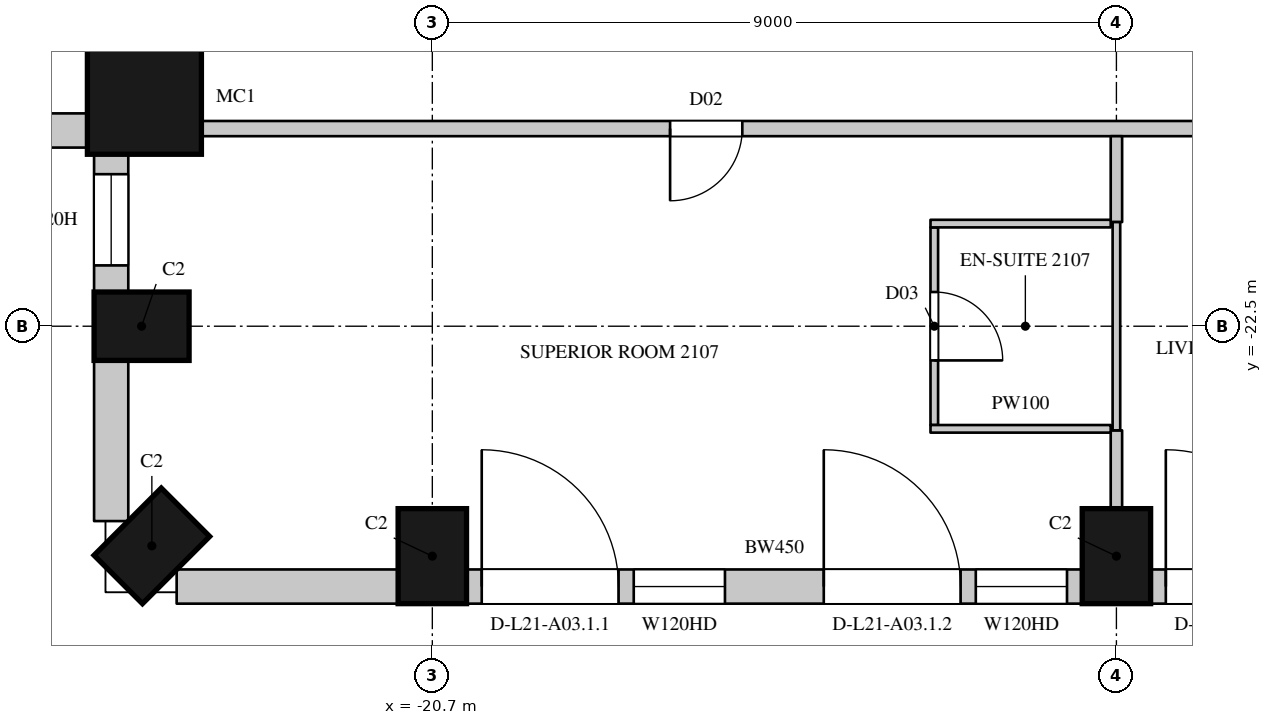
"""IFC4 building model, lengths in metres.
Left out: names, types, materials, properties, quantities, classifications, styles, units other than length and angle.
Written with IfcOpenShell. Run it as: python <this file> out.ifc"""

import sys

from ifc_helpers import new_model, si_unit, direction, frame, frame_2d, origin, origin_2d, place, context, subcontext, project, spatial, rectangle, circle, extrude, element, fill, save


model = new_model("IFC4")
c1 = context("Model", 3, precision=1e-05, world=origin(), true_north=direction((0.0, 1.0)))
c2 = subcontext(c1, "Body", "Model", "MODEL_VIEW")
j1 = project(units=[si_unit("LENGTHUNIT", "METRE"), si_unit("PLANEANGLEUNIT", "RADIAN")], contexts=[c1])
p1 = place(None, origin())
s1 = spatial("IfcSite", under=j1, at=p1, CompositionType="ELEMENT")
p2 = place(p1, origin())
s2 = spatial("IfcBuilding", under=s1, at=p2, CompositionType="ELEMENT")
p3 = place(p2, frame((0.0, 0.0, 105.9)))
s3 = spatial("IfcBuildingStorey", under=s2, at=p3, CompositionType="ELEMENT", Elevation=105.9)
p4 = place(p3, frame((-24.488, -19.488, 0.0), z_axis=(0.0, 0.0, 1.0), x_axis=(1.0, 0.0, 0.0)))
e1 = element("IfcColumn", 1, at=p4, inside=s3, PredefinedType="COLUMN", context=c2, shape_type="SweptSolid", body=[
    extrude(circle(Radius=0.75, at=origin_2d()), origin(), (0.0, 0.0, 1.0), 3.6),
])
for number, where, z_axis, x_axis in (
    (2, (-24.525, -22.5, 0.0), (0.0, 0.0, 1.0), (0.0, -1.0, 0.0)),
    (3, (-24.39, -25.39, 0.0), (0.0, 0.0, 1.0), (0.707, -0.707, 0.0)),
    (4, (-20.7, -25.525, 0.0), (0.0, 0.0, 1.0), (1.0, 0.0, 0.0)),
    (5, (-11.7, -25.525, 0.0), (0.0, 0.0, 1.0), (1.0, 0.0, 0.0)),
):
    element("IfcColumn", number, at=place(p3, frame(where, z_axis=z_axis, x_axis=x_axis)), inside=s3, PredefinedType="COLUMN", context=c2, shape_type="SweptSolid", body=[
        extrude(rectangle(XDim=0.9, YDim=1.25, at=origin_2d()), origin(), (0.0, 0.0, 1.0), 3.6),
    ])
p5 = place(p3, frame((-29.064, -19.925, 0.0), z_axis=(0.0, 0.0, 1.0), x_axis=(1.0, 0.0, 0.0)))
e6 = element("IfcWall", 6, at=p5, inside=s3, PredefinedType="SOLIDWALL", context=c2, shape_type="SweptSolid", body=[
    extrude(rectangle(XDim=3.857, YDim=0.45, at=frame_2d((1.928, 0.0))), origin(), (0.0, 0.0, 1.0), 3.3),
])
p6 = place(p5, frame((0.514, 0.0, 1.05)))
e7 = element("IfcOpeningElement", 7, at=p6, cuts=e6, PredefinedType="OPENING", context=c2, shape_type="SweptSolid", body=[
    extrude(rectangle(XDim=2.7, YDim=2.0, at=frame_2d((1.35, 1.0))), frame((0.0, 0.235, 0.0), z_axis=(0.0, -1.0, 0.0), x_axis=(1.0, 0.0, 0.0)), (0.0, 0.0, 1.0), 0.47),
])
p7 = place(p3, frame((-24.925, -20.207, 0.0), z_axis=(0.0, 0.0, 1.0), x_axis=(0.0, -1.0, 0.0)))
e8 = element("IfcWall", 8, at=p7, inside=s3, PredefinedType="SOLIDWALL", context=c2, shape_type="SweptSolid", body=[
    extrude(rectangle(XDim=1.843, YDim=0.45, at=frame_2d((0.921, 0.0))), origin(), (0.0, 0.0, 1.0), 3.3),
])
p8 = place(p7, frame((0.293, 0.0, 1.05)))
e9 = element("IfcOpeningElement", 9, at=p8, cuts=e8, PredefinedType="OPENING", context=c2, shape_type="SweptSolid", body=[
    extrude(rectangle(XDim=1.2, YDim=2.0, at=frame_2d((0.6, 1.0))), frame((0.0, 0.235, 0.0), z_axis=(0.0, -1.0, 0.0), x_axis=(1.0, 0.0, 0.0)), (0.0, 0.0, 1.0), 0.47),
])
p9 = place(p3, frame((-24.925, -22.95, 0.0), z_axis=(0.0, 0.0, 1.0), x_axis=(0.0, -1.0, 0.0)))
e10 = element("IfcWall", 10, at=p9, inside=s3, PredefinedType="SOLIDWALL", context=c2, shape_type="SweptSolid", body=[
    extrude(rectangle(XDim=2.114, YDim=0.45, at=frame_2d((1.057, 0.0))), origin(), (0.0, 0.0, 1.0), 3.3),
])
p10 = place(p3, frame((-24.064, -25.925, 0.0), z_axis=(0.0, 0.0, 1.0), x_axis=(1.0, 0.0, 0.0)))
e11 = element("IfcWall", 11, at=p10, inside=s3, PredefinedType="SOLIDWALL", context=c2, shape_type="SweptSolid", body=[
    extrude(rectangle(XDim=2.914, YDim=0.45, at=frame_2d((1.457, 0.0))), origin(), (0.0, 0.0, 1.0), 3.3),
])
p11 = place(p3, frame((-20.25, -25.925, 0.0), z_axis=(0.0, 0.0, 1.0), x_axis=(1.0, 0.0, 0.0)))
e12 = element("IfcWall", 12, at=p11, inside=s3, PredefinedType="SOLIDWALL", context=c2, shape_type="SweptSolid", body=[
    extrude(rectangle(XDim=8.1, YDim=0.45, at=frame_2d((4.05, 0.0))), origin(), (0.0, 0.0, 1.0), 3.3),
])
p12 = place(p11, frame((0.2, 0.0, 0.0)))
e13 = element("IfcOpeningElement", 13, at=p12, cuts=e12, PredefinedType="OPENING", context=c2, shape_type="SweptSolid", body=[
    extrude(rectangle(XDim=1.8, YDim=2.4, at=frame_2d((0.9, 1.2))), frame((0.0, 0.235, 0.0), z_axis=(0.0, -1.0, 0.0), x_axis=(1.0, 0.0, 0.0)), (0.0, 0.0, 1.0), 0.47),
])
p13 = place(p11, frame((2.2, 0.0, 1.05)))
e14 = element("IfcOpeningElement", 14, at=p13, cuts=e12, PredefinedType="OPENING", context=c2, shape_type="SweptSolid", body=[
    extrude(rectangle(XDim=1.2, YDim=2.0, at=frame_2d((0.6, 1.0))), frame((0.0, 0.235, 0.0), z_axis=(0.0, -1.0, 0.0), x_axis=(1.0, 0.0, 0.0)), (0.0, 0.0, 1.0), 0.47),
])
p14 = place(p11, frame((4.7, 0.0, 0.0)))
e15 = element("IfcOpeningElement", 15, at=p14, cuts=e12, PredefinedType="OPENING", context=c2, shape_type="SweptSolid", body=[
    extrude(rectangle(XDim=1.8, YDim=2.4, at=frame_2d((0.9, 1.2))), frame((0.0, 0.235, 0.0), z_axis=(0.0, -1.0, 0.0), x_axis=(1.0, 0.0, 0.0)), (0.0, 0.0, 1.0), 0.47),
])
p15 = place(p11, frame((6.7, 0.0, 1.05)))
e16 = element("IfcOpeningElement", 16, at=p15, cuts=e12, PredefinedType="OPENING", context=c2, shape_type="SweptSolid", body=[
    extrude(rectangle(XDim=1.2, YDim=2.0, at=frame_2d((0.6, 1.0))), frame((0.0, 0.235, 0.0), z_axis=(0.0, -1.0, 0.0), x_axis=(1.0, 0.0, 0.0)), (0.0, 0.0, 1.0), 0.47),
])
p16 = place(p3, frame((-11.25, -25.925, 0.0), z_axis=(0.0, 0.0, 1.0), x_axis=(1.0, 0.0, 0.0)))
e17 = element("IfcWall", 17, at=p16, inside=s3, PredefinedType="SOLIDWALL", context=c2, shape_type="SweptSolid", body=[
    extrude(rectangle(XDim=8.1, YDim=0.45, at=frame_2d((4.05, 0.0))), origin(), (0.0, 0.0, 1.0), 3.3),
])
p17 = place(p16, frame((0.2, 0.0, 0.0)))
e18 = element("IfcOpeningElement", 18, at=p17, cuts=e17, PredefinedType="OPENING", context=c2, shape_type="SweptSolid", body=[
    extrude(rectangle(XDim=1.8, YDim=2.4, at=frame_2d((0.9, 1.2))), frame((0.0, 0.235, 0.0), z_axis=(0.0, -1.0, 0.0), x_axis=(1.0, 0.0, 0.0)), (0.0, 0.0, 1.0), 0.47),
])
p18 = place(p16, frame((2.2, 0.0, 1.05)))
e19 = element("IfcOpeningElement", 19, at=p18, cuts=e17, PredefinedType="OPENING", context=c2, shape_type="SweptSolid", body=[
    extrude(rectangle(XDim=1.2, YDim=2.0, at=frame_2d((0.6, 1.0))), frame((0.0, 0.235, 0.0), z_axis=(0.0, -1.0, 0.0), x_axis=(1.0, 0.0, 0.0)), (0.0, 0.0, 1.0), 0.47),
])
p19 = place(p16, frame((4.7, 0.0, 0.0)))
e20 = element("IfcOpeningElement", 20, at=p19, cuts=e17, PredefinedType="OPENING", context=c2, shape_type="SweptSolid", body=[
    extrude(rectangle(XDim=1.8, YDim=2.4, at=frame_2d((0.9, 1.2))), frame((0.0, 0.235, 0.0), z_axis=(0.0, -1.0, 0.0), x_axis=(1.0, 0.0, 0.0)), (0.0, 0.0, 1.0), 0.47),
])
p20 = place(p16, frame((6.7, 0.0, 1.05)))
e21 = element("IfcOpeningElement", 21, at=p20, cuts=e17, PredefinedType="OPENING", context=c2, shape_type="SweptSolid", body=[
    extrude(rectangle(XDim=1.2, YDim=2.0, at=frame_2d((0.6, 1.0))), frame((0.0, 0.235, 0.0), z_axis=(0.0, -1.0, 0.0), x_axis=(1.0, 0.0, 0.0)), (0.0, 0.0, 1.0), 0.47),
])
p21 = place(p3, frame((-23.822, -19.9, 0.0), z_axis=(0.0, 0.0, 1.0), x_axis=(1.0, 0.0, 0.0)))
e22 = element("IfcWall", 22, at=p21, inside=s3, PredefinedType="PARTITIONING", context=c2, shape_type="SweptSolid", body=[
    extrude(rectangle(XDim=42.222, YDim=0.2, at=frame_2d((21.111, 0.0))), origin(), (0.0, 0.0, 1.0), 3.3),
])
p22 = place(p21, frame((6.25, 0.0, 0.0)))
e23 = element("IfcOpeningElement", 23, at=p22, cuts=e22, PredefinedType="OPENING", context=c2, shape_type="SweptSolid", body=[
    extrude(rectangle(XDim=0.95, YDim=2.2, at=frame_2d((0.475, 1.1))), frame((0.0, 0.11, 0.0), z_axis=(0.0, -1.0, 0.0), x_axis=(1.0, 0.0, 0.0)), (0.0, 0.0, 1.0), 0.22),
])
p23 = place(p21, frame((14.15, 0.0, 0.0)))
e24 = element("IfcOpeningElement", 24, at=p23, cuts=e22, PredefinedType="OPENING", context=c2, shape_type="SweptSolid", body=[
    extrude(rectangle(XDim=1.1, YDim=2.4, at=frame_2d((0.55, 1.2))), frame((0.0, 0.11, 0.0), z_axis=(0.0, -1.0, 0.0), x_axis=(1.0, 0.0, 0.0)), (0.0, 0.0, 1.0), 0.22),
])
p24 = place(p21, frame((24.25, 0.0, 0.0)))
e25 = element("IfcOpeningElement", 25, at=p24, cuts=e22, PredefinedType="OPENING", context=c2, shape_type="SweptSolid", body=[
    extrude(rectangle(XDim=0.95, YDim=2.2, at=frame_2d((0.475, 1.1))), frame((0.0, 0.11, 0.0), z_axis=(0.0, -1.0, 0.0), x_axis=(1.0, 0.0, 0.0)), (0.0, 0.0, 1.0), 0.22),
])
p25 = place(p21, frame((32.95, 0.0, 0.0)))
e26 = element("IfcOpeningElement", 26, at=p25, cuts=e22, PredefinedType="OPENING", context=c2, shape_type="SweptSolid", body=[
    extrude(rectangle(XDim=1.1, YDim=2.4, at=frame_2d((0.55, 1.2))), frame((0.0, 0.11, 0.0), z_axis=(0.0, -1.0, 0.0), x_axis=(1.0, 0.0, 0.0)), (0.0, 0.0, 1.0), 0.22),
])
p26 = place(p3, frame((-11.7, -24.9, 0.0), z_axis=(0.0, 0.0, 1.0), x_axis=(0.0, 1.0, 0.0)))
e27 = element("IfcWall", 27, at=p26, inside=s3, PredefinedType="PARTITIONING", context=c2, shape_type="SweptSolid", body=[
    extrude(rectangle(XDim=1.03, YDim=0.15, at=frame_2d((0.515, 0.0))), origin(), (0.0, 0.0, 1.0), 2.75),
])
p27 = place(p3, frame((-11.7, -21.13, 0.0), z_axis=(0.0, 0.0, 1.0), x_axis=(0.0, 1.0, 0.0)))
e28 = element("IfcWall", 28, at=p27, inside=s3, PredefinedType="PARTITIONING", context=c2, shape_type="SweptSolid", body=[
    extrude(rectangle(XDim=1.13, YDim=0.15, at=frame_2d((0.565, 0.0))), origin(), (0.0, 0.0, 1.0), 2.75),
])
p28 = place(p3, frame((-14.096, -23.8, 0.0), z_axis=(0.0, 0.0, 1.0), x_axis=(0.0, 1.0, 0.0)))
e29 = element("IfcWall", 29, at=p28, inside=s3, PredefinedType="PARTITIONING", context=c2, shape_type="SweptSolid", body=[
    extrude(rectangle(XDim=2.6, YDim=0.1, at=frame_2d((1.3, 0.0))), origin(), (0.0, 0.0, 1.0), 3.3),
])
p29 = place(p28, frame((0.85, 0.0, 0.0)))
e30 = element("IfcOpeningElement", 30, at=p29, cuts=e29, PredefinedType="OPENING", context=c2, shape_type="SweptSolid", body=[
    extrude(rectangle(XDim=0.9, YDim=2.2, at=frame_2d((0.45, 1.1))), frame((0.0, 0.06, 0.0), z_axis=(0.0, -1.0, 0.0), x_axis=(1.0, 0.0, 0.0)), (0.0, 0.0, 1.0), 0.12),
])
for number, where, z_axis, x_axis in (
    (31, (-14.146, -23.85, 0.0), (0.0, 0.0, 1.0), (1.0, 0.0, 0.0)),
    (32, (-14.146, -21.15, 0.0), (0.0, 0.0, 1.0), (1.0, 0.0, 0.0)),
):
    element("IfcWall", number, at=place(p3, frame(where, z_axis=z_axis, x_axis=x_axis)), inside=s3, PredefinedType="PARTITIONING", context=c2, shape_type="SweptSolid", body=[
        extrude(rectangle(XDim=2.371, YDim=0.1, at=frame_2d((1.186, 0.0))), origin(), (0.0, 0.0, 1.0), 3.3),
    ])
p30 = place(p3, frame((-11.7, -23.87, 0.0), z_axis=(0.0, 0.0, 1.0), x_axis=(0.0, 1.0, 0.0)))
e33 = element("IfcWall", 33, at=p30, inside=s3, PredefinedType="PARTITIONING", context=c2, shape_type="SweptSolid", body=[
    extrude(rectangle(XDim=2.74, YDim=0.1, at=frame_2d((1.37, 0.0))), origin(), (0.0, 0.0, 1.0), 2.75),
])
p31 = place(p8, origin())
e34 = element("IfcWindow", 34, at=p31, inside=s3, PartitioningType="SINGLE_PANEL", PredefinedType="WINDOW", context=c2, shape_type="SweptSolid", body=[
    extrude(rectangle(XDim=1.2, YDim=2.0, at=frame_2d((0.6, 1.0))), frame((0.0, 0.135, 0.0), z_axis=(0.0, -1.0, 0.0), x_axis=(1.0, 0.0, 0.0)), (0.0, 0.0, 1.0), 0.06),
])
fill(e9, e34)
p32 = place(p12, origin())
e35 = element("IfcDoor", 35, at=p32, inside=s3, OperationType="SLIDING_TO_LEFT", PredefinedType="DOOR", context=c2, shape_type="SweptSolid", body=[
    extrude(rectangle(XDim=1.8, YDim=2.4, at=frame_2d((0.9, 1.2))), frame((0.0, 0.13, 0.0), z_axis=(0.0, -1.0, 0.0), x_axis=(1.0, 0.0, 0.0)), (0.0, 0.0, 1.0), 0.05),
])
fill(e13, e35)
p33 = place(p13, origin())
e36 = element("IfcWindow", 36, at=p33, inside=s3, PartitioningType="SINGLE_PANEL", PredefinedType="WINDOW", context=c2, shape_type="SweptSolid", body=[
    extrude(rectangle(XDim=1.2, YDim=2.0, at=frame_2d((0.6, 1.0))), frame((0.0, 0.135, 0.0), z_axis=(0.0, -1.0, 0.0), x_axis=(1.0, 0.0, 0.0)), (0.0, 0.0, 1.0), 0.06),
])
fill(e14, e36)
p34 = place(p14, origin())
e37 = element("IfcDoor", 37, at=p34, inside=s3, OperationType="SLIDING_TO_LEFT", PredefinedType="DOOR", context=c2, shape_type="SweptSolid", body=[
    extrude(rectangle(XDim=1.8, YDim=2.4, at=frame_2d((0.9, 1.2))), frame((0.0, 0.13, 0.0), z_axis=(0.0, -1.0, 0.0), x_axis=(1.0, 0.0, 0.0)), (0.0, 0.0, 1.0), 0.05),
])
fill(e15, e37)
p35 = place(p15, origin())
e38 = element("IfcWindow", 38, at=p35, inside=s3, PartitioningType="SINGLE_PANEL", PredefinedType="WINDOW", context=c2, shape_type="SweptSolid", body=[
    extrude(rectangle(XDim=1.2, YDim=2.0, at=frame_2d((0.6, 1.0))), frame((0.0, 0.135, 0.0), z_axis=(0.0, -1.0, 0.0), x_axis=(1.0, 0.0, 0.0)), (0.0, 0.0, 1.0), 0.06),
])
fill(e16, e38)
p36 = place(p17, origin())
e39 = element("IfcDoor", 39, at=p36, inside=s3, OperationType="SLIDING_TO_LEFT", PredefinedType="DOOR", context=c2, shape_type="SweptSolid", body=[
    extrude(rectangle(XDim=1.8, YDim=2.4, at=frame_2d((0.9, 1.2))), frame((0.0, 0.13, 0.0), z_axis=(0.0, -1.0, 0.0), x_axis=(1.0, 0.0, 0.0)), (0.0, 0.0, 1.0), 0.05),
])
fill(e18, e39)
p37 = place(p22, origin())
e40 = element("IfcDoor", 40, at=p37, inside=s3, OperationType="SINGLE_SWING_RIGHT", PredefinedType="DOOR", context=c2, shape_type="SweptSolid", body=[
    extrude(rectangle(XDim=0.95, YDim=2.2, at=frame_2d((0.475, 1.1))), frame((0.0, 0.025, 0.0), z_axis=(0.0, -1.0, 0.0), x_axis=(1.0, 0.0, 0.0)), (0.0, 0.0, 1.0), 0.05),
])
fill(e23, e40)
p38 = place(p29, origin())
e41 = element("IfcDoor", 41, at=p38, inside=s3, OperationType="SINGLE_SWING_RIGHT", PredefinedType="DOOR", context=c2, shape_type="SweptSolid", body=[
    extrude(rectangle(XDim=0.9, YDim=2.2, at=frame_2d((0.45, 1.1))), frame((0.0, 0.025, 0.0), z_axis=(0.0, -1.0, 0.0), x_axis=(1.0, 0.0, 0.0)), (0.0, 0.0, 1.0), 0.05),
])
fill(e30, e41)
save(model, sys.argv[1])
